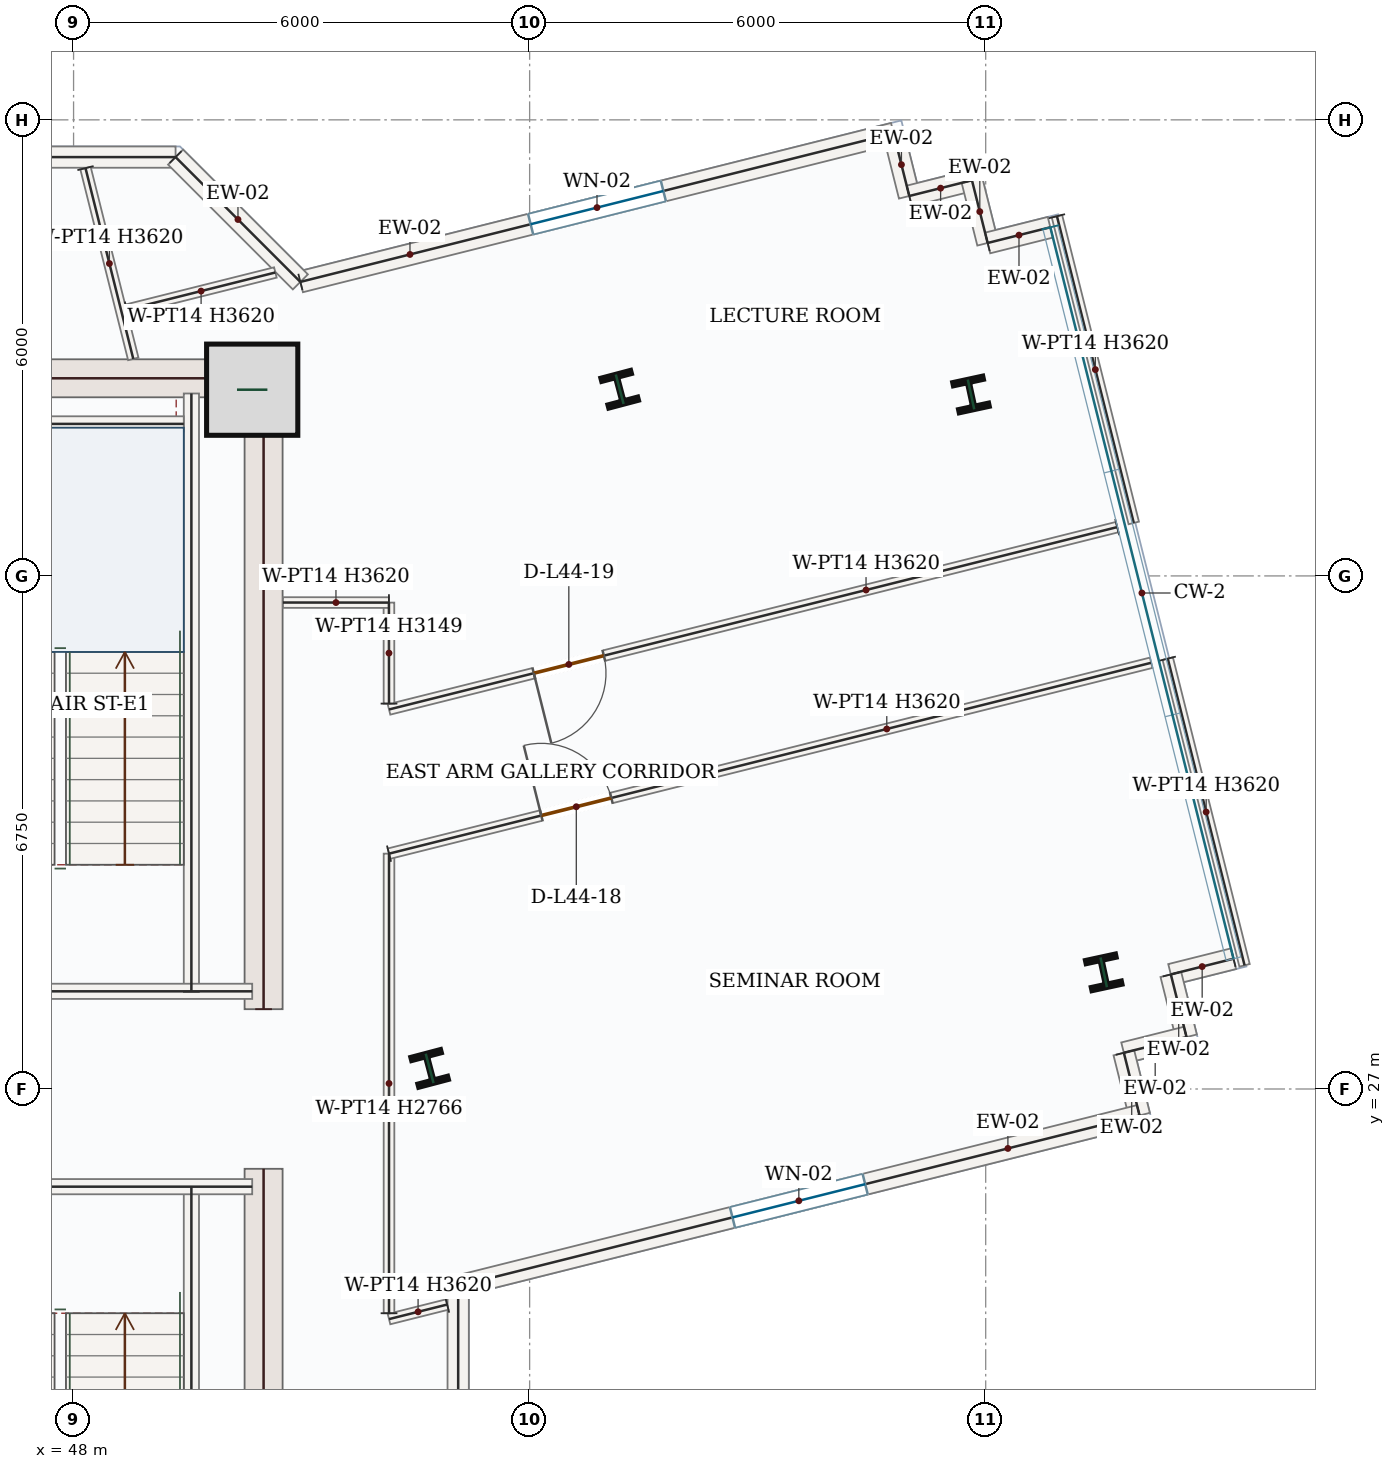
"""IFC4 building model, lengths in metres.
Left out: names, types, materials, properties, quantities, classifications, styles, units other than length and angle.
Written with IfcOpenShell. Run it as: python <this file> out.ifc"""

import sys

from ifc_helpers import new_model, si_unit, direction, frame, frame_2d, origin, origin_2d, place, context, subcontext, project, spatial, rectangle, i_section, extrude, source, transform, mapped, element, fill, save


model = new_model("IFC4")
c1 = context("Model", 3, precision=1e-05, world=origin(), true_north=direction((0.0, 1.0)))
c2 = subcontext(c1, "Body", "Model", "MODEL_VIEW")
j1 = project(units=[si_unit("LENGTHUNIT", "METRE"), si_unit("PLANEANGLEUNIT", "RADIAN")], contexts=[c1])
p1 = place(None, origin())
s1 = spatial("IfcSite", under=j1, at=p1, CompositionType="ELEMENT")
p2 = place(p1, origin())
s2 = spatial("IfcBuilding", under=s1, at=p2, CompositionType="ELEMENT")
p3 = place(p2, frame((0.0, 0.0, 190.2)))
s3 = spatial("IfcBuildingStorey", under=s2, at=p3, CompositionType="ELEMENT", Elevation=190.2)
m1 = source(origin(), c2, "Body", "SweptSolid", [
    extrude(rectangle(XDim=8.55, YDim=0.5, at=frame_2d((4.275, 0.0))), origin(), (0.0, 0.0, 1.0), 3.62),
])
for number, where, z_axis, x_axis in (
    (1, (50.5, 17.4, 0.0), (0.0, 0.0, 1.0), (0.0, 1.0, 0.0)),
    (2, (50.5, 28.05, 0.0), (0.0, 0.0, 1.0), (0.0, 1.0, 0.0)),
):
    element("IfcWall", number, at=place(p3, frame(where, z_axis=z_axis, x_axis=x_axis)), inside=s3, PredefinedType="SHEAR", context=c2, shape_type="MappedRepresentation", body=[
        mapped(m1, transform((0.0, 0.0, 0.0), x_axis=(1.0, 0.0, 0.0), y_axis=(0.0, 1.0, 0.0), z_axis=(0.0, 0.0, 1.0), scale=1.0)),
    ])
m2 = source(origin(), c2, "Body", "SweptSolid", [
    extrude(rectangle(XDim=7.0, YDim=0.5, at=frame_2d((3.5, 0.0))), origin(), (0.0, 0.0, 1.0), 3.62),
])
p4 = place(p3, frame((43.25, 36.35, 0.0), z_axis=(0.0, 0.0, 1.0), x_axis=(1.0, 0.0, 0.0)))
e3 = element("IfcWall", 3, at=p4, inside=s3, PredefinedType="SHEAR", context=c2, shape_type="MappedRepresentation", body=[
    mapped(m2, transform((0.0, 0.0, 0.0), x_axis=(1.0, 0.0, 0.0), y_axis=(0.0, 1.0, 0.0), z_axis=(0.0, 0.0, 1.0), scale=1.0)),
])
m3 = source(origin(), c2, "Body", "SweptSolid", [
    extrude(rectangle(XDim=1.2, YDim=1.2, at=origin_2d()), origin(), (0.0, 0.0, 1.0), 3.9),
])
p5 = place(p3, frame((50.35, 36.2, 0.0), z_axis=(0.0, 0.0, 1.0), x_axis=(1.0, 0.0, 0.0)))
e4 = element("IfcColumn", 4, at=p5, inside=s3, PredefinedType="COLUMN", context=c2, shape_type="MappedRepresentation", body=[
    mapped(m3, transform((0.0, 0.0, 0.0), x_axis=(1.0, 0.0, 0.0), y_axis=(0.0, 1.0, 0.0), z_axis=(0.0, 0.0, 1.0), scale=1.0)),
])
m4 = source(origin(), c2, "Body", "SweptSolid", [
    extrude(i_section(OverallWidth=0.404, OverallDepth=0.407, WebThickness=0.027, FlangeThickness=0.044, FilletRadius=0.018, at=origin_2d()), origin(), (0.0, 0.0, 1.0), 3.9),
])
for number, where, z_axis, x_axis in (
    (5, (52.684, 27.271, 0.0), (0.0, 0.0, 1.0), (0.967, 0.255, 0.0)),
    (6, (55.185, 36.206, 0.0), (0.0, 0.0, 1.0), (0.967, 0.255, 0.0)),
    (7, (61.553, 28.535, 0.0), (0.0, 0.0, 1.0), (0.977, 0.211, 0.0)),
    (8, (59.807, 36.137, 0.0), (0.0, 0.0, 1.0), (0.977, 0.211, 0.0)),
):
    element("IfcColumn", number, at=place(p3, frame(where, z_axis=z_axis, x_axis=x_axis)), inside=s3, PredefinedType="COLUMN", context=c2, shape_type="MappedRepresentation", body=[
        mapped(m4, transform((0.0, 0.0, 0.0), x_axis=(1.0, 0.0, 0.0), y_axis=(0.0, 1.0, 0.0), z_axis=(0.0, 0.0, 1.0), scale=1.0)),
    ])
p6 = place(p3, frame((50.984, 37.618, 0.0), z_axis=(0.0, 0.0, 1.0), x_axis=(0.970040669564, 0.242942584557, 0.0)))
e9 = element("IfcWall", 9, at=p6, inside=s3, PredefinedType="SOLIDWALL", context=c2, shape_type="SweptSolid", body=[
    extrude(rectangle(XDim=8.045, YDim=0.28, at=frame_2d((4.023, 0.0))), origin(), (0.0, 0.0, 1.0), 3.62),
])
p7 = place(p6, frame((3.123, 0.0, 0.85)))
e10 = element("IfcOpeningElement", 10, at=p7, cuts=e9, PredefinedType="OPENING", context=c2, shape_type="SweptSolid", body=[
    extrude(rectangle(XDim=1.8, YDim=1.75, at=frame_2d((0.9, 0.875))), frame((0.0, 0.15, 0.0), z_axis=(0.0, -1.0, 0.0), x_axis=(1.0, 0.0, 0.0)), (0.0, 0.0, 1.0), 0.3),
])
m5 = source(origin(), c2, "Body", "SweptSolid", [
    extrude(rectangle(XDim=0.85, YDim=0.28, at=frame_2d((0.425, 0.0))), origin(), (0.0, 0.0, 1.0), 3.62),
])
for number, where, z_axis, x_axis in (
    (11, (58.788, 39.573, 0.0), (0.0, 0.0, 1.0), (0.243, -0.97, 0.0)),
    (12, (58.995, 38.748, 0.0), (0.0, 0.0, 1.0), (0.97, 0.243, 0.0)),
):
    element("IfcWall", number, at=place(p3, frame(where, z_axis=z_axis, x_axis=x_axis)), inside=s3, PredefinedType="SOLIDWALL", context=c2, shape_type="MappedRepresentation", body=[
        mapped(m5, transform((0.0, 0.0, 0.0), x_axis=(1.0, 0.0, 0.0), y_axis=(0.0, 1.0, 0.0), z_axis=(0.0, 0.0, 1.0), scale=1.0)),
    ])
m6 = source(origin(), c2, "Body", "SweptSolid", [
    extrude(rectangle(XDim=0.85, YDim=0.28, at=frame_2d((0.425, 0.0))), origin(), (0.0, 0.0, 1.0), 3.62),
])
p8 = place(p3, frame((59.819, 38.955, 0.0), z_axis=(0.0, 0.0, 1.0), x_axis=(0.242941012307, -0.970041063326, 0.0)))
e13 = element("IfcWall", 13, at=p8, inside=s3, PredefinedType="SOLIDWALL", context=c2, shape_type="MappedRepresentation", body=[
    mapped(m6, transform((0.0, 0.0, 0.0), x_axis=(1.0, 0.0, 0.0), y_axis=(0.0, 1.0, 0.0), z_axis=(0.0, 0.0, 1.0), scale=1.0)),
])
for number, where, z_axis, x_axis in (
    (14, (60.026, 38.13, 0.0), (0.0, 0.0, 1.0), (0.97, 0.243, 0.0)),
    (15, (63.26, 28.714, 0.0), (0.0, 0.0, 1.0), (-0.97, -0.243, 0.0)),
    (16, (62.436, 28.507, 0.0), (0.0, 0.0, 1.0), (0.243, -0.97, 0.0)),
):
    element("IfcWall", number, at=place(p3, frame(where, z_axis=z_axis, x_axis=x_axis)), inside=s3, PredefinedType="SOLIDWALL", context=c2, shape_type="MappedRepresentation", body=[
        mapped(m5, transform((0.0, 0.0, 0.0), x_axis=(1.0, 0.0, 0.0), y_axis=(0.0, 1.0, 0.0), z_axis=(0.0, 0.0, 1.0), scale=1.0)),
    ])
p9 = place(p3, frame((62.642, 27.683, 0.0), z_axis=(0.0, 0.0, 1.0), x_axis=(-0.970041063326, -0.242941012307, 0.0)))
e17 = element("IfcWall", 17, at=p9, inside=s3, PredefinedType="SOLIDWALL", context=c2, shape_type="MappedRepresentation", body=[
    mapped(m6, transform((0.0, 0.0, 0.0), x_axis=(1.0, 0.0, 0.0), y_axis=(0.0, 1.0, 0.0), z_axis=(0.0, 0.0, 1.0), scale=1.0)),
])
p10 = place(p3, frame((61.818, 27.476, 0.0), z_axis=(0.0, 0.0, 1.0), x_axis=(0.243008704507, -0.970024107708, 0.0)))
e18 = element("IfcWall", 18, at=p10, inside=s3, PredefinedType="SOLIDWALL", context=c2, shape_type="MappedRepresentation", body=[
    mapped(m5, transform((0.0, 0.0, 0.0), x_axis=(1.0, 0.0, 0.0), y_axis=(0.0, 1.0, 0.0), z_axis=(0.0, 0.0, 1.0), scale=1.0)),
])
p11 = place(p3, frame((62.024, 26.652, 0.0), z_axis=(0.0, 0.0, 1.0), x_axis=(-0.970044513566, -0.242927235402, 0.0)))
e19 = element("IfcWall", 19, at=p11, inside=s3, PredefinedType="SOLIDWALL", context=c2, shape_type="SweptSolid", body=[
    extrude(rectangle(XDim=9.241, YDim=0.28, at=frame_2d((4.621, 0.0))), origin(), (0.0, 0.0, 1.0), 3.62),
])
p12 = place(p11, frame((3.721, 0.0, 0.85)))
e20 = element("IfcOpeningElement", 20, at=p12, cuts=e19, PredefinedType="OPENING", context=c2, shape_type="SweptSolid", body=[
    extrude(rectangle(XDim=1.8, YDim=1.75, at=frame_2d((0.9, 0.875))), frame((0.0, 0.15, 0.0), z_axis=(0.0, -1.0, 0.0), x_axis=(1.0, 0.0, 0.0)), (0.0, 0.0, 1.0), 0.3),
])
m7 = source(origin(), c2, "Body", "SweptSolid", [
    extrude(rectangle(XDim=5.949, YDim=0.28, at=frame_2d((2.975, 0.0))), origin(), (0.0, 0.0, 1.0), 3.62),
])
p13 = place(p3, frame((53.06, 24.407, 0.0), z_axis=(0.0, 0.0, 1.0), x_axis=(0.0, -1.0, 0.0)))
e21 = element("IfcWall", 21, at=p13, inside=s3, PredefinedType="SOLIDWALL", context=c2, shape_type="MappedRepresentation", body=[
    mapped(m7, transform((0.0, 0.0, 0.0), x_axis=(1.0, 0.0, 0.0), y_axis=(0.0, 1.0, 0.0), z_axis=(0.0, 0.0, 1.0), scale=1.0)),
])
m8 = source(origin(), c2, "Body", "SweptSolid", [
    extrude(rectangle(XDim=9.547, YDim=0.28, at=frame_2d((4.773, 0.0))), origin(), (0.0, 0.0, 1.0), 3.62),
])
p14 = place(p3, frame((39.795, 39.26, 0.0), z_axis=(0.0, 0.0, 1.0), x_axis=(1.0, 0.0, 0.0)))
e22 = element("IfcWall", 22, at=p14, inside=s3, PredefinedType="SOLIDWALL", context=c2, shape_type="MappedRepresentation", body=[
    mapped(m8, transform((0.0, 0.0, 0.0), x_axis=(1.0, 0.0, 0.0), y_axis=(0.0, 1.0, 0.0), z_axis=(0.0, 0.0, 1.0), scale=1.0)),
])
m9 = source(origin(), c2, "Body", "SweptSolid", [
    extrude(rectangle(XDim=2.322, YDim=0.28, at=frame_2d((1.161, 0.0))), origin(), (0.0, 0.0, 1.0), 3.62),
])
p15 = place(p3, frame((49.342, 39.26, 0.0), z_axis=(0.0, 0.0, 1.0), x_axis=(0.707106781187, -0.707106781187, 0.0)))
e23 = element("IfcWall", 23, at=p15, inside=s3, PredefinedType="SOLIDWALL", context=c2, shape_type="MappedRepresentation", body=[
    mapped(m9, transform((0.0, 0.0, 0.0), x_axis=(1.0, 0.0, 0.0), y_axis=(0.0, 1.0, 0.0), z_axis=(0.0, 0.0, 1.0), scale=1.0)),
])
m10 = source(origin(), c2, "Body", "SweptSolid", [
    extrude(rectangle(XDim=7.87, YDim=0.2, at=frame_2d((3.935, 0.0))), origin(), (0.0, 0.0, 1.0), 3.62),
])
for number, where, z_axis, x_axis in (
    (24, (49.55, 17.85, 0.0), (0.0, 0.0, 1.0), (0.0, 1.0, 0.0)),
    (25, (49.55, 28.28, 0.0), (0.0, 0.0, 1.0), (0.0, 1.0, 0.0)),
):
    element("IfcWall", number, at=place(p3, frame(where, z_axis=z_axis, x_axis=x_axis)), inside=s3, PredefinedType="SOLIDWALL", context=c2, shape_type="MappedRepresentation", body=[
        mapped(m10, transform((0.0, 0.0, 0.0), x_axis=(1.0, 0.0, 0.0), y_axis=(0.0, 1.0, 0.0), z_axis=(0.0, 0.0, 1.0), scale=1.0)),
    ])
m11 = source(origin(), c2, "Body", "SweptSolid", [
    extrude(rectangle(XDim=4.25, YDim=0.2, at=frame_2d((2.125, 0.0))), origin(), (0.0, 0.0, 1.0), 3.62),
])
for number, where, z_axis, x_axis in (
    (26, (46.1, 25.715, 0.0), (0.0, 0.0, 1.0), (1.0, 0.0, 0.0)),
    (27, (46.1, 28.285, 0.0), (0.0, 0.0, 1.0), (1.0, 0.0, 0.0)),
):
    element("IfcWall", number, at=place(p3, frame(where, z_axis=z_axis, x_axis=x_axis)), inside=s3, PredefinedType="SOLIDWALL", context=c2, shape_type="MappedRepresentation", body=[
        mapped(m11, transform((0.0, 0.0, 0.0), x_axis=(1.0, 0.0, 0.0), y_axis=(0.0, 1.0, 0.0), z_axis=(0.0, 0.0, 1.0), scale=1.0)),
    ])
m12 = source(origin(), c2, "Body", "SweptSolid", [
    extrude(rectangle(XDim=3.25, YDim=0.2, at=frame_2d((1.625, 0.0))), origin(), (0.0, 0.0, 1.0), 3.62),
])
p16 = place(p3, frame((46.2, 35.75, 0.0), z_axis=(0.0, 0.0, 1.0), x_axis=(1.0, 0.0, 0.0)))
e28 = element("IfcWall", 28, at=p16, inside=s3, PredefinedType="SOLIDWALL", context=c2, shape_type="MappedRepresentation", body=[
    mapped(m12, transform((0.0, 0.0, 0.0), x_axis=(1.0, 0.0, 0.0), y_axis=(0.0, 1.0, 0.0), z_axis=(0.0, 0.0, 1.0), scale=1.0)),
])
m13 = source(origin(), c2, "Body", "SweptSolid", [
    extrude(rectangle(XDim=2.588, YDim=0.14, at=frame_2d((1.294, 0.0))), origin(), (0.0, 0.0, 1.0), 3.62),
])
p17 = place(p3, frame((48.157, 39.115, 0.0), z_axis=(0.0, 0.0, 1.0), x_axis=(0.242957412811, -0.97003695577, 0.0)))
e29 = element("IfcWall", 29, at=p17, inside=s3, PredefinedType="PARTITIONING", context=c2, shape_type="MappedRepresentation", body=[
    mapped(m13, transform((0.0, 0.0, 0.0), x_axis=(1.0, 0.0, 0.0), y_axis=(0.0, 1.0, 0.0), z_axis=(0.0, 0.0, 1.0), scale=1.0)),
])
m14 = source(origin(), c2, "Body", "SweptSolid", [
    extrude(rectangle(XDim=2.014, YDim=0.14, at=frame_2d((1.007, 0.0))), origin(), (0.0, 0.0, 1.0), 3.62),
])
p18 = place(p3, frame((48.701, 37.253, 0.0), z_axis=(0.0, 0.0, 1.0), x_axis=(0.970056889313, 0.242877811867, 0.0)))
e30 = element("IfcWall", 30, at=p18, inside=s3, PredefinedType="PARTITIONING", context=c2, shape_type="MappedRepresentation", body=[
    mapped(m14, transform((0.0, 0.0, 0.0), x_axis=(1.0, 0.0, 0.0), y_axis=(0.0, 1.0, 0.0), z_axis=(0.0, 0.0, 1.0), scale=1.0)),
])
m15 = source(origin(), c2, "Body", "SweptSolid", [
    extrude(rectangle(XDim=4.16, YDim=0.14, at=frame_2d((2.08, 0.0))), origin(), (0.0, 0.0, 1.0), 3.62),
])
p19 = place(p3, frame((60.938, 38.482, 0.0), z_axis=(0.0, 0.0, 1.0), x_axis=(0.242963670411, -0.970035388458, 0.0)))
e31 = element("IfcWall", 31, at=p19, inside=s3, PredefinedType="PARTITIONING", context=c2, shape_type="MappedRepresentation", body=[
    mapped(m15, transform((0.0, 0.0, 0.0), x_axis=(1.0, 0.0, 0.0), y_axis=(0.0, 1.0, 0.0), z_axis=(0.0, 0.0, 1.0), scale=1.0)),
])
p20 = place(p3, frame((61.73, 34.392, 0.0), z_axis=(0.0, 0.0, 1.0), x_axis=(-0.970043536382, -0.242931137411, 0.0)))
e32 = element("IfcWall", 32, at=p20, inside=s3, PredefinedType="PARTITIONING", context=c2, shape_type="SweptSolid", body=[
    extrude(rectangle(XDim=9.876, YDim=0.14, at=frame_2d((4.938, 0.0))), origin(), (0.0, 0.0, 1.0), 3.62),
])
p21 = place(p20, frame((6.962, 0.0, 0.0)))
e33 = element("IfcOpeningElement", 33, at=p21, cuts=e32, PredefinedType="OPENING", context=c2, shape_type="SweptSolid", body=[
    extrude(rectangle(XDim=0.95, YDim=2.15, at=frame_2d((0.475, 1.075))), frame((0.0, 0.08, 0.0), z_axis=(0.0, -1.0, 0.0), x_axis=(1.0, 0.0, 0.0)), (0.0, 0.0, 1.0), 0.16),
])
m16 = source(origin(), c2, "Body", "SweptSolid", [
    extrude(rectangle(XDim=1.329, YDim=0.14, at=frame_2d((0.664, 0.0))), origin(), (0.0, 0.0, 1.0), 3.149),
])
p22 = place(p3, frame((52.15, 32.07, 0.0), z_axis=(0.0, 0.0, 1.0), x_axis=(-0.00073502369, 0.99999972987, 0.0)))
e34 = element("IfcWall", 34, at=p22, inside=s3, PredefinedType="PARTITIONING", context=c2, shape_type="MappedRepresentation", body=[
    mapped(m16, transform((0.0, 0.0, 0.0), x_axis=(1.0, 0.0, 0.0), y_axis=(0.0, 1.0, 0.0), z_axis=(0.0, 0.0, 1.0), scale=1.0)),
])
m17 = source(origin(), c2, "Body", "SweptSolid", [
    extrude(rectangle(XDim=1.394, YDim=0.14, at=frame_2d((0.697, 0.0))), origin(), (0.0, 0.0, 1.0), 3.62),
])
p23 = place(p3, frame((52.149, 33.399, 0.0), z_axis=(0.0, 0.0, 1.0), x_axis=(-0.999999754632, 0.000700525222, 0.0)))
e35 = element("IfcWall", 35, at=p23, inside=s3, PredefinedType="PARTITIONING", context=c2, shape_type="MappedRepresentation", body=[
    mapped(m17, transform((0.0, 0.0, 0.0), x_axis=(1.0, 0.0, 0.0), y_axis=(0.0, 1.0, 0.0), z_axis=(0.0, 0.0, 1.0), scale=1.0)),
])
p24 = place(p3, frame((62.395, 32.662, 0.0), z_axis=(0.0, 0.0, 1.0), x_axis=(0.242963670411, -0.970035388458, 0.0)))
e36 = element("IfcWall", 36, at=p24, inside=s3, PredefinedType="PARTITIONING", context=c2, shape_type="MappedRepresentation", body=[
    mapped(m15, transform((0.0, 0.0, 0.0), x_axis=(1.0, 0.0, 0.0), y_axis=(0.0, 1.0, 0.0), z_axis=(0.0, 0.0, 1.0), scale=1.0)),
])
m18 = source(origin(), c2, "Body", "SweptSolid", [
    extrude(rectangle(XDim=0.789, YDim=0.14, at=frame_2d((0.395, 0.0))), origin(), (0.0, 0.0, 1.0), 3.62),
])
p25 = place(p3, frame((52.915, 24.164, 0.0), z_axis=(0.0, 0.0, 1.0), x_axis=(-0.970033159667, -0.242972568711, 0.0)))
e37 = element("IfcWall", 37, at=p25, inside=s3, PredefinedType="PARTITIONING", context=c2, shape_type="MappedRepresentation", body=[
    mapped(m18, transform((0.0, 0.0, 0.0), x_axis=(1.0, 0.0, 0.0), y_axis=(0.0, 1.0, 0.0), z_axis=(0.0, 0.0, 1.0), scale=1.0)),
])
m19 = source(origin(), c2, "Body", "SweptSolid", [
    extrude(rectangle(XDim=6.046, YDim=0.14, at=frame_2d((3.023, 0.0))), origin(), (0.0, 0.0, 1.0), 2.766),
])
p26 = place(p3, frame((52.15, 24.05, 0.0), z_axis=(0.0, 0.0, 1.0), x_axis=(0.0, 1.0, 0.0)))
e38 = element("IfcWall", 38, at=p26, inside=s3, PredefinedType="PARTITIONING", context=c2, shape_type="MappedRepresentation", body=[
    mapped(m19, transform((0.0, 0.0, 0.0), x_axis=(1.0, 0.0, 0.0), y_axis=(0.0, 1.0, 0.0), z_axis=(0.0, 0.0, 1.0), scale=1.0)),
])
p27 = place(p3, frame((52.15, 30.096, 0.0), z_axis=(0.0, 0.0, 1.0), x_axis=(0.970040994122, 0.242941288635, 0.0)))
e39 = element("IfcWall", 39, at=p27, inside=s3, PredefinedType="PARTITIONING", context=c2, shape_type="SweptSolid", body=[
    extrude(rectangle(XDim=10.337, YDim=0.14, at=frame_2d((5.168, 0.0))), origin(), (0.0, 0.0, 1.0), 3.62),
])
p28 = place(p27, frame((2.065, 0.0, 0.0)))
e40 = element("IfcOpeningElement", 40, at=p28, cuts=e39, PredefinedType="OPENING", context=c2, shape_type="SweptSolid", body=[
    extrude(rectangle(XDim=0.95, YDim=2.15, at=frame_2d((0.475, 1.075))), frame((0.0, 0.08, 0.0), z_axis=(0.0, -1.0, 0.0), x_axis=(1.0, 0.0, 0.0)), (0.0, 0.0, 1.0), 0.16),
])
m20 = source(origin(), c2, "Body", "SweptSolid", [
    extrude(rectangle(XDim=1.8, YDim=1.75, at=frame_2d((0.9, 0.875))), frame((0.0, 0.03, 0.0), z_axis=(0.0, -1.0, 0.0), x_axis=(1.0, 0.0, 0.0)), (0.0, 0.0, 1.0), 0.06),
])
p29 = place(p7, origin())
e41 = element("IfcWindow", 41, at=p29, inside=s3, PartitioningType="DOUBLE_PANEL_VERTICAL", PredefinedType="WINDOW", context=c2, shape_type="MappedRepresentation", body=[
    mapped(m20, transform((0.0, 0.0, 0.0), x_axis=(1.0, 0.0, 0.0), y_axis=(0.0, 1.0, 0.0), z_axis=(0.0, 0.0, 1.0), scale=1.0)),
])
fill(e10, e41)
p30 = place(p12, origin())
e42 = element("IfcWindow", 42, at=p30, inside=s3, PartitioningType="DOUBLE_PANEL_VERTICAL", PredefinedType="WINDOW", context=c2, shape_type="MappedRepresentation", body=[
    mapped(m20, transform((0.0, 0.0, 0.0), x_axis=(1.0, 0.0, 0.0), y_axis=(0.0, 1.0, 0.0), z_axis=(0.0, 0.0, 1.0), scale=1.0)),
])
fill(e20, e42)
m21 = source(origin(), c2, "Body", "SweptSolid", [
    extrude(rectangle(XDim=0.95, YDim=2.15, at=frame_2d((0.475, 1.075))), frame((0.0, 0.025, 0.0), z_axis=(0.0, -1.0, 0.0), x_axis=(1.0, 0.0, 0.0)), (0.0, 0.0, 1.0), 0.05),
])
p31 = place(p28, origin())
e43 = element("IfcDoor", 43, at=p31, inside=s3, OperationType="SINGLE_SWING_LEFT", PredefinedType="DOOR", context=c2, shape_type="MappedRepresentation", body=[
    mapped(m21, transform((0.0, 0.0, 0.0), x_axis=(1.0, 0.0, 0.0), y_axis=(0.0, 1.0, 0.0), z_axis=(0.0, 0.0, 1.0), scale=1.0)),
])
fill(e40, e43)
p32 = place(p21, origin())
e44 = element("IfcDoor", 44, at=p32, inside=s3, OperationType="SINGLE_SWING_RIGHT", PredefinedType="DOOR", context=c2, shape_type="MappedRepresentation", body=[
    mapped(m21, transform((0.0, 0.0, 0.0), x_axis=(1.0, 0.0, 0.0), y_axis=(0.0, 1.0, 0.0), z_axis=(0.0, 0.0, 1.0), scale=1.0)),
])
fill(e33, e44)
save(model, sys.argv[1])
